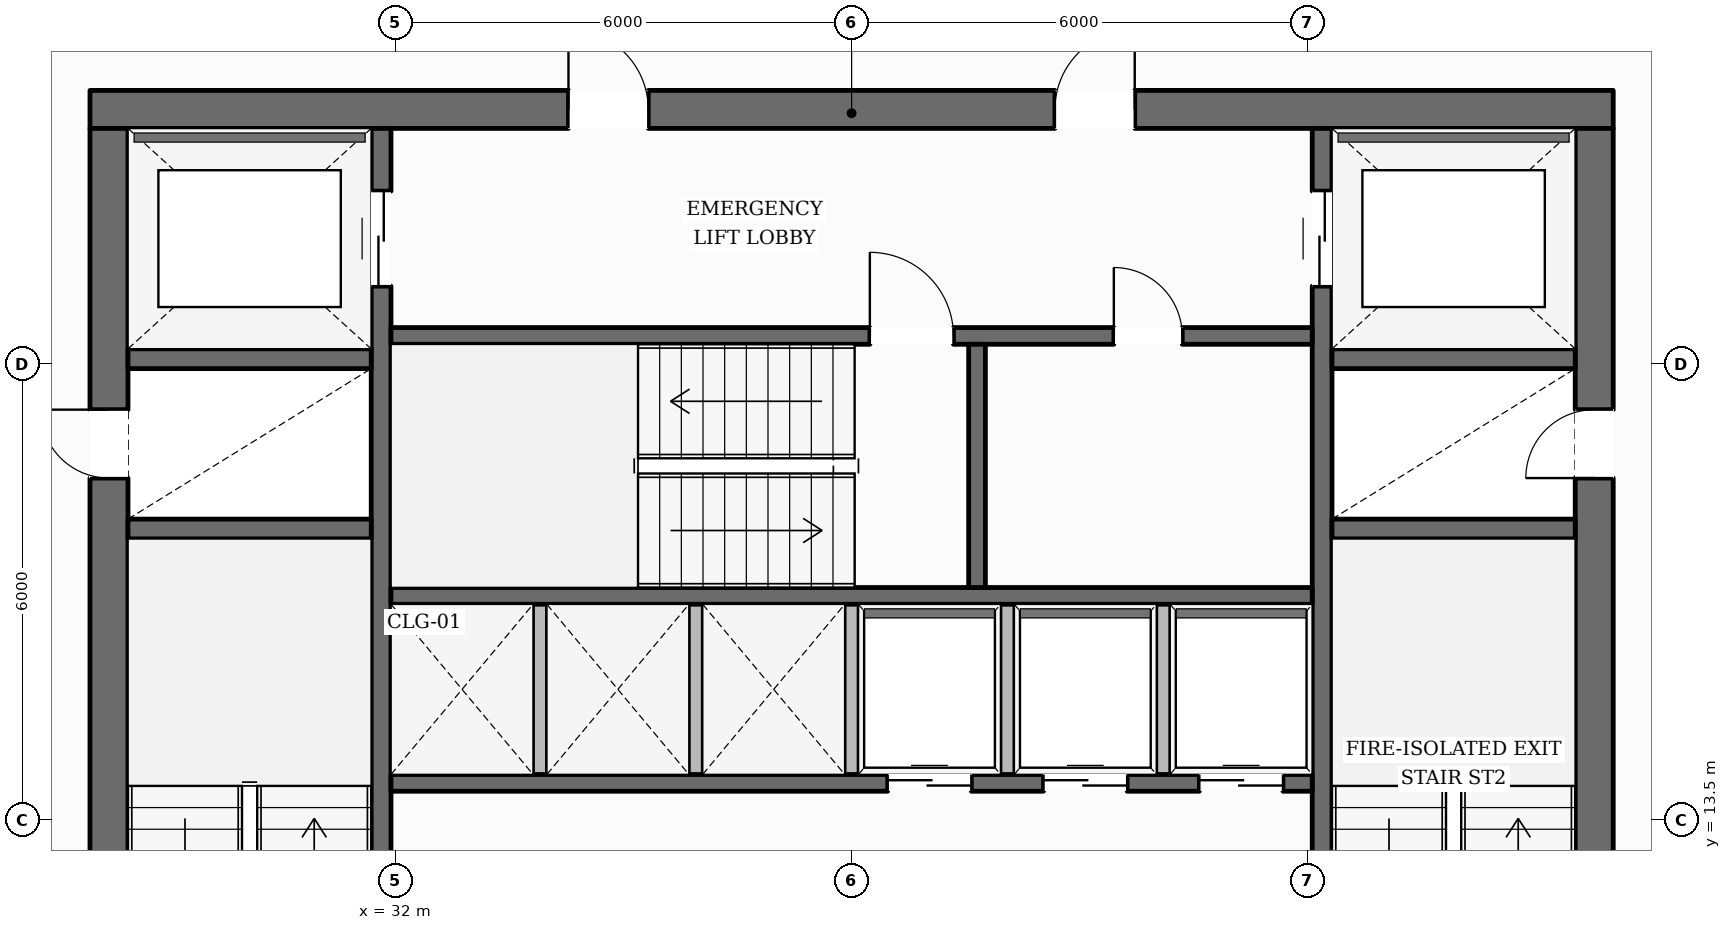
"""IFC4 building model, lengths in metres.
Left out: names, types, materials, properties, quantities, classifications, styles, units other than length and angle.
Written with IfcOpenShell. Run it as: python <this file> out.ifc"""

import sys

from ifc_helpers import new_model, si_unit, direction, frame, frame_2d, origin, place, context, subcontext, project, spatial, rectangle, extrude, element, fill, save


model = new_model("IFC4")
c1 = context("Model", 3, precision=1e-05, world=origin(), true_north=direction((0.0, 1.0)))
c2 = subcontext(c1, "Body", "Model", "MODEL_VIEW")
j1 = project(units=[si_unit("LENGTHUNIT", "METRE"), si_unit("PLANEANGLEUNIT", "RADIAN")], contexts=[c1])
p1 = place(None, origin())
s1 = spatial("IfcSite", under=j1, at=p1, CompositionType="ELEMENT")
p2 = place(p1, origin())
s2 = spatial("IfcBuilding", under=s1, at=p2, CompositionType="ELEMENT")
p3 = place(p2, frame((0.0, 0.0, 85.5)))
s3 = spatial("IfcBuildingStorey", under=s2, at=p3, CompositionType="ELEMENT", Elevation=85.5)
p4 = place(p3, frame((27.98, 22.85, 0.0), z_axis=(0.0, 0.0, 1.0), x_axis=(1.0, 0.0, 0.0)))
e1 = element("IfcWall", 1, at=p4, inside=s3, PredefinedType="SOLIDWALL", context=c2, shape_type="SweptSolid", body=[
    extrude(rectangle(XDim=20.04, YDim=0.5, at=frame_2d((10.02, 0.0))), origin(), (0.0, 0.0, 1.0), 3.6),
])
p5 = place(p4, frame((6.295, 0.0, 0.0)))
e2 = element("IfcOpeningElement", 2, at=p5, cuts=e1, PredefinedType="OPENING", context=c2, shape_type="SweptSolid", body=[
    extrude(rectangle(XDim=1.05, YDim=2.15, at=frame_2d((0.525, 1.075))), frame((0.0, 0.26, 0.0), z_axis=(0.0, -1.0, 0.0), x_axis=(1.0, 0.0, 0.0)), (0.0, 0.0, 1.0), 0.52),
])
p6 = place(p4, frame((12.695, 0.0, 0.0)))
e3 = element("IfcOpeningElement", 3, at=p6, cuts=e1, PredefinedType="OPENING", context=c2, shape_type="SweptSolid", body=[
    extrude(rectangle(XDim=1.05, YDim=2.15, at=frame_2d((0.525, 1.075))), frame((0.0, 0.26, 0.0), z_axis=(0.0, -1.0, 0.0), x_axis=(1.0, 0.0, 0.0)), (0.0, 0.0, 1.0), 0.52),
])
p7 = place(p3, frame((28.23, 9.6, 0.0), z_axis=(0.0, 0.0, 1.0), x_axis=(0.0, 1.0, 0.0)))
e4 = element("IfcWall", 4, at=p7, inside=s3, PredefinedType="SOLIDWALL", context=c2, shape_type="SweptSolid", body=[
    extrude(rectangle(XDim=13.0, YDim=0.5, at=frame_2d((6.5, 0.0))), origin(), (0.0, 0.0, 1.0), 3.6),
])
p8 = place(p7, frame((0.2, 0.0, 0.0)))
e5 = element("IfcOpeningElement", 5, at=p8, cuts=e4, PredefinedType="OPENING", context=c2, shape_type="SweptSolid", body=[
    extrude(rectangle(XDim=1.1, YDim=2.15, at=frame_2d((0.55, 1.075))), frame((0.0, 0.26, 0.0), z_axis=(0.0, -1.0, 0.0), x_axis=(1.0, 0.0, 0.0)), (0.0, 0.0, 1.0), 0.52),
])
p9 = place(p7, frame((8.4, 0.0, 0.0)))
e6 = element("IfcOpeningElement", 6, at=p9, cuts=e4, PredefinedType="OPENING", context=c2, shape_type="SweptSolid", body=[
    extrude(rectangle(XDim=0.9, YDim=2.1, at=frame_2d((0.45, 1.05))), frame((0.0, 0.26, 0.0), z_axis=(0.0, -1.0, 0.0), x_axis=(1.0, 0.0, 0.0)), (0.0, 0.0, 1.0), 0.52),
])
p10 = place(p3, frame((47.77, 9.6, 0.0), z_axis=(0.0, 0.0, 1.0), x_axis=(0.0, 1.0, 0.0)))
e7 = element("IfcWall", 7, at=p10, inside=s3, PredefinedType="SOLIDWALL", context=c2, shape_type="SweptSolid", body=[
    extrude(rectangle(XDim=13.0, YDim=0.5, at=frame_2d((6.5, 0.0))), origin(), (0.0, 0.0, 1.0), 3.6),
])
p11 = place(p10, frame((0.2, 0.0, 0.0)))
e8 = element("IfcOpeningElement", 8, at=p11, cuts=e7, PredefinedType="OPENING", context=c2, shape_type="SweptSolid", body=[
    extrude(rectangle(XDim=1.1, YDim=2.15, at=frame_2d((0.55, 1.075))), frame((0.0, 0.26, 0.0), z_axis=(0.0, -1.0, 0.0), x_axis=(1.0, 0.0, 0.0)), (0.0, 0.0, 1.0), 0.52),
])
p12 = place(p10, frame((8.4, 0.0, 0.0)))
e9 = element("IfcOpeningElement", 9, at=p12, cuts=e7, PredefinedType="OPENING", context=c2, shape_type="SweptSolid", body=[
    extrude(rectangle(XDim=0.9, YDim=2.1, at=frame_2d((0.45, 1.05))), frame((0.0, 0.26, 0.0), z_axis=(0.0, -1.0, 0.0), x_axis=(1.0, 0.0, 0.0)), (0.0, 0.0, 1.0), 0.52),
])
p13 = place(p3, frame((31.81, 9.6, 0.0), z_axis=(0.0, 0.0, 1.0), x_axis=(0.0, 1.0, 0.0)))
e10 = element("IfcWall", 10, at=p13, inside=s3, PredefinedType="SHEAR", context=c2, shape_type="SweptSolid", body=[
    extrude(rectangle(XDim=13.0, YDim=0.26, at=frame_2d((6.5, 0.0))), origin(), (0.0, 0.0, 1.0), 3.6),
])
p14 = place(p13, frame((10.925, 0.0, 0.0)))
e11 = element("IfcOpeningElement", 11, at=p14, cuts=e10, PredefinedType="OPENING", context=c2, shape_type="SweptSolid", body=[
    extrude(rectangle(XDim=1.25, YDim=2.25, at=frame_2d((0.625, 1.125))), frame((0.0, 0.14, 0.0), z_axis=(0.0, -1.0, 0.0), x_axis=(1.0, 0.0, 0.0)), (0.0, 0.0, 1.0), 0.28),
])
p15 = place(p3, frame((44.19, 9.6, 0.0), z_axis=(0.0, 0.0, 1.0), x_axis=(0.0, 1.0, 0.0)))
e12 = element("IfcWall", 12, at=p15, inside=s3, PredefinedType="SHEAR", context=c2, shape_type="SweptSolid", body=[
    extrude(rectangle(XDim=13.0, YDim=0.26, at=frame_2d((6.5, 0.0))), origin(), (0.0, 0.0, 1.0), 3.6),
])
p16 = place(p15, frame((10.925, 0.0, 0.0)))
e13 = element("IfcOpeningElement", 13, at=p16, cuts=e12, PredefinedType="OPENING", context=c2, shape_type="SweptSolid", body=[
    extrude(rectangle(XDim=1.25, YDim=2.25, at=frame_2d((0.625, 1.125))), frame((0.0, 0.14, 0.0), z_axis=(0.0, -1.0, 0.0), x_axis=(1.0, 0.0, 0.0)), (0.0, 0.0, 1.0), 0.28),
])
for number, where, z_axis, x_axis in (
    (14, (28.48, 17.33, 0.0), (0.0, 0.0, 1.0), (1.0, 0.0, 0.0)),
    (15, (28.48, 19.57, 0.0), (0.0, 0.0, 1.0), (1.0, 0.0, 0.0)),
    (16, (44.32, 17.33, 0.0), (0.0, 0.0, 1.0), (1.0, 0.0, 0.0)),
    (17, (44.32, 19.57, 0.0), (0.0, 0.0, 1.0), (1.0, 0.0, 0.0)),
):
    element("IfcWall", number, at=place(p3, frame(where, z_axis=z_axis, x_axis=x_axis)), inside=s3, PredefinedType="SHEAR", context=c2, shape_type="SweptSolid", body=[
        extrude(rectangle(XDim=3.2, YDim=0.26, at=frame_2d((1.6, 0.0))), origin(), (0.0, 0.0, 1.0), 3.6),
    ])
p17 = place(p3, frame((31.94, 19.87, 0.0), z_axis=(0.0, 0.0, 1.0), x_axis=(1.0, 0.0, 0.0)))
e18 = element("IfcWall", 18, at=p17, inside=s3, PredefinedType="SOLIDWALL", context=c2, shape_type="SweptSolid", body=[
    extrude(rectangle(XDim=12.12, YDim=0.22, at=frame_2d((6.06, 0.0))), origin(), (0.0, 0.0, 1.0), 3.6),
])
p18 = place(p17, frame((6.3, 0.0, 0.0)))
e19 = element("IfcOpeningElement", 19, at=p18, cuts=e18, PredefinedType="OPENING", context=c2, shape_type="SweptSolid", body=[
    extrude(rectangle(XDim=1.1, YDim=2.15, at=frame_2d((0.55, 1.075))), frame((0.0, 0.12, 0.0), z_axis=(0.0, -1.0, 0.0), x_axis=(1.0, 0.0, 0.0)), (0.0, 0.0, 1.0), 0.24),
])
p19 = place(p17, frame((9.51, 0.0, 0.0)))
e20 = element("IfcOpeningElement", 20, at=p19, cuts=e18, PredefinedType="OPENING", context=c2, shape_type="SweptSolid", body=[
    extrude(rectangle(XDim=0.9, YDim=2.1, at=frame_2d((0.45, 1.05))), frame((0.0, 0.12, 0.0), z_axis=(0.0, -1.0, 0.0), x_axis=(1.0, 0.0, 0.0)), (0.0, 0.0, 1.0), 0.24),
])
p20 = place(p3, frame((31.94, 16.45, 0.0), z_axis=(0.0, 0.0, 1.0), x_axis=(1.0, 0.0, 0.0)))
e21 = element("IfcWall", 21, at=p20, inside=s3, PredefinedType="SOLIDWALL", context=c2, shape_type="SweptSolid", body=[
    extrude(rectangle(XDim=12.12, YDim=0.22, at=frame_2d((6.06, 0.0))), origin(), (0.0, 0.0, 1.0), 3.6),
])
p21 = place(p3, frame((39.65, 16.56, 0.0), z_axis=(0.0, 0.0, 1.0), x_axis=(0.0, 1.0, 0.0)))
e22 = element("IfcWall", 22, at=p21, inside=s3, PredefinedType="SOLIDWALL", context=c2, shape_type="SweptSolid", body=[
    extrude(rectangle(XDim=3.2, YDim=0.22, at=frame_2d((1.6, 0.0))), origin(), (0.0, 0.0, 1.0), 3.6),
])
p22 = place(p3, frame((31.94, 13.99, 0.0), z_axis=(0.0, 0.0, 1.0), x_axis=(1.0, 0.0, 0.0)))
e23 = element("IfcWall", 23, at=p22, inside=s3, PredefinedType="SOLIDWALL", context=c2, shape_type="SweptSolid", body=[
    extrude(rectangle(XDim=12.12, YDim=0.22, at=frame_2d((6.06, 0.0))), origin(), (0.0, 0.0, 1.0), 3.6),
])
p23 = place(p22, frame((6.535, 0.0, 0.0)))
e24 = element("IfcOpeningElement", 24, at=p23, cuts=e23, PredefinedType="OPENING", context=c2, shape_type="SweptSolid", body=[
    extrude(rectangle(XDim=1.1, YDim=2.2, at=frame_2d((0.55, 1.1))), frame((0.0, 0.12, 0.0), z_axis=(0.0, -1.0, 0.0), x_axis=(1.0, 0.0, 0.0)), (0.0, 0.0, 1.0), 0.24),
])
p24 = place(p22, frame((8.585, 0.0, 0.0)))
e25 = element("IfcOpeningElement", 25, at=p24, cuts=e23, PredefinedType="OPENING", context=c2, shape_type="SweptSolid", body=[
    extrude(rectangle(XDim=1.1, YDim=2.2, at=frame_2d((0.55, 1.1))), frame((0.0, 0.12, 0.0), z_axis=(0.0, -1.0, 0.0), x_axis=(1.0, 0.0, 0.0)), (0.0, 0.0, 1.0), 0.24),
])
p25 = place(p22, frame((10.635, 0.0, 0.0)))
e26 = element("IfcOpeningElement", 26, at=p25, cuts=e23, PredefinedType="OPENING", context=c2, shape_type="SweptSolid", body=[
    extrude(rectangle(XDim=1.1, YDim=2.2, at=frame_2d((0.55, 1.1))), frame((0.0, 0.12, 0.0), z_axis=(0.0, -1.0, 0.0), x_axis=(1.0, 0.0, 0.0)), (0.0, 0.0, 1.0), 0.24),
])
p26 = place(p3, frame((13.817, 13.509, 0.0), z_axis=(0.0, 0.0, 1.0), x_axis=(0.498436356308, 0.866926293701, 0.0)))
e27 = element("IfcWall", 27, at=p26, inside=s3, PredefinedType="STANDARD", context=c2, shape_type="SweptSolid", body=[
    extrude(rectangle(XDim=35.622, YDim=0.38, at=frame_2d((17.811, 0.0))), origin(), (0.0, 0.0, 1.0), 3.059),
])
p27 = place(p26, frame((31.481, 0.0, 0.65)))
e28 = element("IfcOpeningElement", 28, at=p27, cuts=e27, PredefinedType="OPENING", context=c2, shape_type="SweptSolid", body=[
    extrude(rectangle(XDim=1.55, YDim=1.75, at=frame_2d((0.775, 0.875))), frame((0.0, 0.2, 0.0), z_axis=(0.0, -1.0, 0.0), x_axis=(1.0, 0.0, 0.0)), (0.0, 0.0, 1.0), 0.4),
])
p28 = place(p26, frame((25.703, 0.0, 0.65)))
e29 = element("IfcOpeningElement", 29, at=p28, cuts=e27, PredefinedType="OPENING", context=c2, shape_type="SweptSolid", body=[
    extrude(rectangle(XDim=1.55, YDim=1.75, at=frame_2d((0.775, 0.875))), frame((0.0, 0.2, 0.0), z_axis=(0.0, -1.0, 0.0), x_axis=(1.0, 0.0, 0.0)), (0.0, 0.0, 1.0), 0.4),
])
p29 = place(p26, frame((14.146, 0.0, 0.65)))
e30 = element("IfcOpeningElement", 30, at=p29, cuts=e27, PredefinedType="OPENING", context=c2, shape_type="SweptSolid", body=[
    extrude(rectangle(XDim=1.55, YDim=1.75, at=frame_2d((0.775, 0.875))), frame((0.0, 0.2, 0.0), z_axis=(0.0, -1.0, 0.0), x_axis=(1.0, 0.0, 0.0)), (0.0, 0.0, 1.0), 0.4),
])
p30 = place(p26, frame((8.367, 0.0, 0.65)))
e31 = element("IfcOpeningElement", 31, at=p30, cuts=e27, PredefinedType="OPENING", context=c2, shape_type="SweptSolid", body=[
    extrude(rectangle(XDim=1.55, YDim=1.75, at=frame_2d((0.775, 0.875))), frame((0.0, 0.2, 0.0), z_axis=(0.0, -1.0, 0.0), x_axis=(1.0, 0.0, 0.0)), (0.0, 0.0, 1.0), 0.4),
])
p31 = place(p26, frame((2.589, 0.0, 0.65)))
e32 = element("IfcOpeningElement", 32, at=p31, cuts=e27, PredefinedType="OPENING", context=c2, shape_type="SweptSolid", body=[
    extrude(rectangle(XDim=1.55, YDim=1.75, at=frame_2d((0.775, 0.875))), frame((0.0, 0.2, 0.0), z_axis=(0.0, -1.0, 0.0), x_axis=(1.0, 0.0, 0.0)), (0.0, 0.0, 1.0), 0.4),
])
p32 = place(p3, frame((44.314, 44.458, 0.0), z_axis=(0.0, 0.0, 1.0), x_axis=(0.494118179016, -0.869394746456, 0.0)))
e33 = element("IfcWall", 33, at=p32, inside=s3, PredefinedType="STANDARD", context=c2, shape_type="SweptSolid", body=[
    extrude(rectangle(XDim=35.322, YDim=0.38, at=frame_2d((17.661, 0.0))), origin(), (0.0, 0.0, 1.0), 3.059),
])
p33 = place(p32, frame((31.209, 0.0, 0.65)))
e34 = element("IfcOpeningElement", 34, at=p33, cuts=e33, PredefinedType="OPENING", context=c2, shape_type="SweptSolid", body=[
    extrude(rectangle(XDim=1.55, YDim=1.75, at=frame_2d((0.775, 0.875))), frame((0.0, 0.2, 0.0), z_axis=(0.0, -1.0, 0.0), x_axis=(1.0, 0.0, 0.0)), (0.0, 0.0, 1.0), 0.4),
])
p34 = place(p32, frame((25.481, 0.0, 0.65)))
e35 = element("IfcOpeningElement", 35, at=p34, cuts=e33, PredefinedType="OPENING", context=c2, shape_type="SweptSolid", body=[
    extrude(rectangle(XDim=1.55, YDim=1.75, at=frame_2d((0.775, 0.875))), frame((0.0, 0.2, 0.0), z_axis=(0.0, -1.0, 0.0), x_axis=(1.0, 0.0, 0.0)), (0.0, 0.0, 1.0), 0.4),
])
p35 = place(p32, frame((14.025, 0.0, 0.65)))
e36 = element("IfcOpeningElement", 36, at=p35, cuts=e33, PredefinedType="OPENING", context=c2, shape_type="SweptSolid", body=[
    extrude(rectangle(XDim=1.55, YDim=1.75, at=frame_2d((0.775, 0.875))), frame((0.0, 0.2, 0.0), z_axis=(0.0, -1.0, 0.0), x_axis=(1.0, 0.0, 0.0)), (0.0, 0.0, 1.0), 0.4),
])
p36 = place(p32, frame((8.298, 0.0, 0.65)))
e37 = element("IfcOpeningElement", 37, at=p36, cuts=e33, PredefinedType="OPENING", context=c2, shape_type="SweptSolid", body=[
    extrude(rectangle(XDim=1.55, YDim=1.75, at=frame_2d((0.775, 0.875))), frame((0.0, 0.2, 0.0), z_axis=(0.0, -1.0, 0.0), x_axis=(1.0, 0.0, 0.0)), (0.0, 0.0, 1.0), 0.4),
])
p37 = place(p32, frame((2.57, 0.0, 0.65)))
e38 = element("IfcOpeningElement", 38, at=p37, cuts=e33, PredefinedType="OPENING", context=c2, shape_type="SweptSolid", body=[
    extrude(rectangle(XDim=1.55, YDim=1.75, at=frame_2d((0.775, 0.875))), frame((0.0, 0.2, 0.0), z_axis=(0.0, -1.0, 0.0), x_axis=(1.0, 0.0, 0.0)), (0.0, 0.0, 1.0), 0.4),
])
for number, where, z_axis, x_axis in (
    (39, (33.9, 14.1, 0.0), (0.0, 0.0, 1.0), (0.0, 1.0, 0.0)),
    (40, (35.95, 14.1, 0.0), (0.0, 0.0, 1.0), (0.0, 1.0, 0.0)),
    (41, (38.0, 14.1, 0.0), (0.0, 0.0, 1.0), (0.0, 1.0, 0.0)),
    (42, (40.05, 14.1, 0.0), (0.0, 0.0, 1.0), (0.0, 1.0, 0.0)),
    (43, (42.1, 14.1, 0.0), (0.0, 0.0, 1.0), (0.0, 1.0, 0.0)),
):
    element("IfcWall", number, at=place(p3, frame(where, z_axis=z_axis, x_axis=x_axis)), inside=s3, PredefinedType="PARTITIONING", context=c2, shape_type="SweptSolid", body=[
        extrude(rectangle(XDim=2.24, YDim=0.165, at=frame_2d((1.12, 0.0))), origin(), (0.0, 0.0, 1.0), 3.6),
    ])
p38 = place(p18, origin())
e44 = element("IfcDoor", 44, at=p38, inside=s3, OperationType="SINGLE_SWING_LEFT", PredefinedType="DOOR", context=c2, shape_type="SweptSolid", body=[
    extrude(rectangle(XDim=1.1, YDim=2.15, at=frame_2d((0.55, 1.075))), frame((0.0, 0.025, 0.0), z_axis=(0.0, -1.0, 0.0), x_axis=(1.0, 0.0, 0.0)), (0.0, 0.0, 1.0), 0.05),
])
fill(e19, e44)
p39 = place(p9, origin())
e45 = element("IfcDoor", 45, at=p39, inside=s3, OperationType="SINGLE_SWING_RIGHT", PredefinedType="DOOR", context=c2, shape_type="SweptSolid", body=[
    extrude(rectangle(XDim=0.9, YDim=2.1, at=frame_2d((0.45, 1.05))), frame((0.0, 0.025, 0.0), z_axis=(0.0, -1.0, 0.0), x_axis=(1.0, 0.0, 0.0)), (0.0, 0.0, 1.0), 0.05),
])
fill(e6, e45)
p40 = place(p12, origin())
e46 = element("IfcDoor", 46, at=p40, inside=s3, OperationType="SINGLE_SWING_LEFT", PredefinedType="DOOR", context=c2, shape_type="SweptSolid", body=[
    extrude(rectangle(XDim=0.9, YDim=2.1, at=frame_2d((0.45, 1.05))), frame((0.0, 0.025, 0.0), z_axis=(0.0, -1.0, 0.0), x_axis=(1.0, 0.0, 0.0)), (0.0, 0.0, 1.0), 0.05),
])
fill(e9, e46)
p41 = place(p5, origin())
e47 = element("IfcDoor", 47, at=p41, inside=s3, OperationType="SINGLE_SWING_LEFT", PredefinedType="DOOR", context=c2, shape_type="SweptSolid", body=[
    extrude(rectangle(XDim=1.05, YDim=2.15, at=frame_2d((0.525, 1.075))), frame((0.0, 0.025, 0.0), z_axis=(0.0, -1.0, 0.0), x_axis=(1.0, 0.0, 0.0)), (0.0, 0.0, 1.0), 0.05),
])
fill(e2, e47)
p42 = place(p6, origin())
e48 = element("IfcDoor", 48, at=p42, inside=s3, OperationType="SINGLE_SWING_RIGHT", PredefinedType="DOOR", context=c2, shape_type="SweptSolid", body=[
    extrude(rectangle(XDim=1.05, YDim=2.15, at=frame_2d((0.525, 1.075))), frame((0.0, 0.025, 0.0), z_axis=(0.0, -1.0, 0.0), x_axis=(1.0, 0.0, 0.0)), (0.0, 0.0, 1.0), 0.05),
])
fill(e3, e48)
p43 = place(p14, origin())
e49 = element("IfcDoor", 49, at=p43, inside=s3, OperationType="DOUBLE_DOOR_SLIDING", PredefinedType="DOOR", context=c2, shape_type="SweptSolid", body=[
    extrude(rectangle(XDim=1.25, YDim=2.25, at=frame_2d((0.625, 1.125))), frame((0.0, 0.025, 0.0), z_axis=(0.0, -1.0, 0.0), x_axis=(1.0, 0.0, 0.0)), (0.0, 0.0, 1.0), 0.05),
])
fill(e11, e49)
p44 = place(p16, origin())
e50 = element("IfcDoor", 50, at=p44, inside=s3, OperationType="DOUBLE_DOOR_SLIDING", PredefinedType="DOOR", context=c2, shape_type="SweptSolid", body=[
    extrude(rectangle(XDim=1.25, YDim=2.25, at=frame_2d((0.625, 1.125))), frame((0.0, 0.025, 0.0), z_axis=(0.0, -1.0, 0.0), x_axis=(1.0, 0.0, 0.0)), (0.0, 0.0, 1.0), 0.05),
])
fill(e13, e50)
p45 = place(p23, origin())
e51 = element("IfcDoor", 51, at=p45, inside=s3, OperationType="DOUBLE_DOOR_SLIDING", PredefinedType="DOOR", context=c2, shape_type="SweptSolid", body=[
    extrude(rectangle(XDim=1.1, YDim=2.2, at=frame_2d((0.55, 1.1))), frame((0.0, 0.025, 0.0), z_axis=(0.0, -1.0, 0.0), x_axis=(1.0, 0.0, 0.0)), (0.0, 0.0, 1.0), 0.05),
])
fill(e24, e51)
p46 = place(p24, origin())
e52 = element("IfcDoor", 52, at=p46, inside=s3, OperationType="DOUBLE_DOOR_SLIDING", PredefinedType="DOOR", context=c2, shape_type="SweptSolid", body=[
    extrude(rectangle(XDim=1.1, YDim=2.2, at=frame_2d((0.55, 1.1))), frame((0.0, 0.025, 0.0), z_axis=(0.0, -1.0, 0.0), x_axis=(1.0, 0.0, 0.0)), (0.0, 0.0, 1.0), 0.05),
])
fill(e25, e52)
p47 = place(p25, origin())
e53 = element("IfcDoor", 53, at=p47, inside=s3, OperationType="DOUBLE_DOOR_SLIDING", PredefinedType="DOOR", context=c2, shape_type="SweptSolid", body=[
    extrude(rectangle(XDim=1.1, YDim=2.2, at=frame_2d((0.55, 1.1))), frame((0.0, 0.025, 0.0), z_axis=(0.0, -1.0, 0.0), x_axis=(1.0, 0.0, 0.0)), (0.0, 0.0, 1.0), 0.05),
])
fill(e26, e53)
p48 = place(p19, origin())
e54 = element("IfcDoor", 54, at=p48, inside=s3, OperationType="SINGLE_SWING_LEFT", PredefinedType="DOOR", context=c2, shape_type="SweptSolid", body=[
    extrude(rectangle(XDim=0.9, YDim=2.1, at=frame_2d((0.45, 1.05))), frame((0.0, 0.025, 0.0), z_axis=(0.0, -1.0, 0.0), x_axis=(1.0, 0.0, 0.0)), (0.0, 0.0, 1.0), 0.05),
])
fill(e20, e54)
save(model, sys.argv[1])
